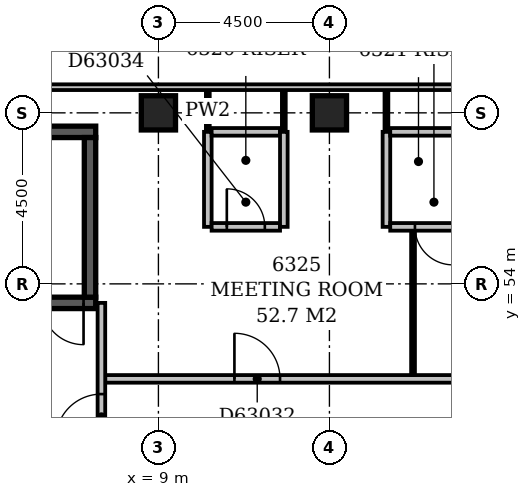
"""IFC4 building model, lengths in metres.
Left out: names, types, materials, properties, quantities, classifications, styles, units other than length and angle.
Written with IfcOpenShell. Run it as: python <this file> out.ifc"""

import sys

from ifc_helpers import new_model, si_unit, direction, frame, frame_2d, origin, origin_2d, place, context, subcontext, project, spatial, rectangle, extrude, element, fill, save


model = new_model("IFC4")
c1 = context("Model", 3, precision=1e-05, world=origin(), true_north=direction((0.0, 1.0)))
c2 = subcontext(c1, "Body", "Model", "MODEL_VIEW")
j1 = project(units=[si_unit("LENGTHUNIT", "METRE"), si_unit("PLANEANGLEUNIT", "RADIAN")], contexts=[c1])
p1 = place(None, origin())
s1 = spatial("IfcSite", under=j1, at=p1, CompositionType="ELEMENT")
p2 = place(p1, origin())
s2 = spatial("IfcBuilding", under=s1, at=p2, CompositionType="ELEMENT")
p3 = place(p2, frame((0.0, 0.0, 243.8)))
s3 = spatial("IfcBuildingStorey", under=s2, at=p3, CompositionType="ELEMENT", Elevation=243.8)
p4 = place(p3, frame((0.35, 53.5, -0.3), z_axis=(0.0, 0.0, 1.0), x_axis=(1.0, 0.0, 0.0)))
e1 = element("IfcWall", 1, at=p4, inside=s3, PredefinedType="SHEAR", context=c2, shape_type="SweptSolid", body=[
    extrude(rectangle(XDim=7.0, YDim=0.3, at=frame_2d((3.5, 0.0))), origin(), (0.0, 0.0, 1.0), 3.6),
])
p5 = place(p4, frame((5.58, 0.0, 0.3)))
e2 = element("IfcOpeningElement", 2, at=p5, cuts=e1, PredefinedType="OPENING", context=c2, shape_type="SweptSolid", body=[
    extrude(rectangle(XDim=1.1, YDim=2.1, at=frame_2d((0.55, 1.05))), frame((0.0, 0.162, 0.0), z_axis=(0.0, -1.0, 0.0), x_axis=(1.0, 0.0, 0.0)), (0.0, 0.0, 1.0), 0.324),
])
p6 = place(p3, frame((0.35, 58.0, -0.3), z_axis=(0.0, 0.0, 1.0), x_axis=(1.0, 0.0, 0.0)))
e3 = element("IfcWall", 3, at=p6, inside=s3, PredefinedType="SHEAR", context=c2, shape_type="SweptSolid", body=[
    extrude(rectangle(XDim=7.0, YDim=0.3, at=frame_2d((3.5, 0.0))), origin(), (0.0, 0.0, 1.0), 3.6),
])
p7 = place(p3, frame((7.2, 53.65, -0.3), z_axis=(0.0, 0.0, 1.0), x_axis=(0.0, 1.0, 0.0)))
e4 = element("IfcWall", 4, at=p7, inside=s3, PredefinedType="SHEAR", context=c2, shape_type="SweptSolid", body=[
    extrude(rectangle(XDim=4.2, YDim=0.3, at=frame_2d((2.1, 0.0))), origin(), (0.0, 0.0, 1.0), 3.6),
])
for number, where, z_axis, x_axis in (
    (5, (9.0, 58.5, -0.3), (0.0, 0.0, 1.0), (1.0, 0.0, 0.0)),
    (6, (13.5, 58.5, -0.3), (0.0, 0.0, 1.0), (1.0, 0.0, 0.0)),
):
    element("IfcColumn", number, at=place(p3, frame(where, z_axis=z_axis, x_axis=x_axis)), inside=s3, PredefinedType="COLUMN", context=c2, shape_type="SweptSolid", body=[
        extrude(rectangle(XDim=0.9, YDim=0.9, at=origin_2d()), origin(), (0.0, 0.0, 1.0), 3.6),
    ])
p8 = place(p3, frame((27.0, 59.175, 0.0), z_axis=(0.0, 0.0, 1.0), x_axis=(-1.0, 0.0, 0.0)))
e7 = element("IfcWall", 7, at=p8, inside=s3, PredefinedType="STANDARD", context=c2, shape_type="SweptSolid", body=[
    extrude(rectangle(XDim=27.75, YDim=0.15, at=frame_2d((13.875, 0.0))), origin(), (0.0, 0.0, 1.0), 2.7),
])
p9 = place(p3, frame((7.5, 49.6, 0.0), z_axis=(0.0, 0.0, 1.0), x_axis=(0.0, 1.0, 0.0)))
e8 = element("IfcWall", 8, at=p9, inside=s3, PredefinedType="PARTITIONING", context=c2, shape_type="SweptSolid", body=[
    extrude(rectangle(XDim=3.9, YDim=0.2, at=frame_2d((1.95, 0.0))), origin(), (0.0, 0.0, 1.0), 3.3),
])
p10 = place(p9, frame((0.3, 0.0, 0.0)))
e9 = element("IfcOpeningElement", 9, at=p10, cuts=e8, PredefinedType="OPENING", context=c2, shape_type="SweptSolid", body=[
    extrude(rectangle(XDim=1.2, YDim=2.1, at=frame_2d((0.6, 1.05))), frame((0.0, 0.112, 0.0), z_axis=(0.0, -1.0, 0.0), x_axis=(1.0, 0.0, 0.0)), (0.0, 0.0, 1.0), 0.224),
])
p11 = place(p3, frame((7.6, 51.5, 0.0), z_axis=(0.0, 0.0, 1.0), x_axis=(1.0, 0.0, 0.0)))
e10 = element("IfcWall", 10, at=p11, inside=s3, PredefinedType="PARTITIONING", context=c2, shape_type="SweptSolid", body=[
    extrude(rectangle(XDim=14.65, YDim=0.2, at=frame_2d((7.325, 0.0))), origin(), (0.0, 0.0, 1.0), 3.3),
])
p12 = place(p11, frame((3.4, 0.0, 0.0)))
e11 = element("IfcOpeningElement", 11, at=p12, cuts=e10, PredefinedType="OPENING", context=c2, shape_type="SweptSolid", body=[
    extrude(rectangle(XDim=1.2, YDim=2.1, at=frame_2d((0.6, 1.05))), frame((0.0, 0.112, 0.0), z_axis=(0.0, -1.0, 0.0), x_axis=(1.0, 0.0, 0.0)), (0.0, 0.0, 1.0), 0.224),
])
p13 = place(p11, frame((10.925, 0.0, 0.0)))
e12 = element("IfcOpeningElement", 12, at=p13, cuts=e10, PredefinedType="OPENING", context=c2, shape_type="SweptSolid", body=[
    extrude(rectangle(XDim=1.0, YDim=2.1, at=frame_2d((0.5, 1.05))), frame((0.0, 0.112, 0.0), z_axis=(0.0, -1.0, 0.0), x_axis=(1.0, 0.0, 0.0)), (0.0, 0.0, 1.0), 0.224),
])
p14 = place(p3, frame((15.7, 51.6, 0.0), z_axis=(0.0, 0.0, 1.0), x_axis=(0.0, 1.0, 0.0)))
e13 = element("IfcWall", 13, at=p14, inside=s3, PredefinedType="PARTITIONING", context=c2, shape_type="SweptSolid", body=[
    extrude(rectangle(XDim=3.8, YDim=0.1, at=frame_2d((1.9, 0.0))), origin(), (0.0, 0.0, 1.0), 3.3),
])
p15 = place(p3, frame((10.3, 55.5, 0.0), z_axis=(0.0, 0.0, 1.0), x_axis=(0.0, 1.0, 0.0)))
e14 = element("IfcWall", 14, at=p15, inside=s3, PredefinedType="PARTITIONING", context=c2, shape_type="SweptSolid", body=[
    extrude(rectangle(XDim=2.5, YDim=0.2, at=frame_2d((1.25, 0.0))), origin(), (0.0, 0.0, 1.0), 3.3),
])
p16 = place(p3, frame((10.4, 55.5, 0.0), z_axis=(0.0, 0.0, 1.0), x_axis=(1.0, 0.0, 0.0)))
e15 = element("IfcWall", 15, at=p16, inside=s3, PredefinedType="PARTITIONING", context=c2, shape_type="SweptSolid", body=[
    extrude(rectangle(XDim=1.8, YDim=0.2, at=frame_2d((0.9, 0.0))), origin(), (0.0, 0.0, 1.0), 3.3),
])
p17 = place(p16, frame((0.4, 0.0, 0.0)))
e16 = element("IfcOpeningElement", 16, at=p17, cuts=e15, PredefinedType="OPENING", context=c2, shape_type="SweptSolid", body=[
    extrude(rectangle(XDim=1.0, YDim=2.1, at=frame_2d((0.5, 1.05))), frame((0.0, 0.112, 0.0), z_axis=(0.0, -1.0, 0.0), x_axis=(1.0, 0.0, 0.0)), (0.0, 0.0, 1.0), 0.224),
])
for number, where, z_axis, x_axis in (
    (17, (12.3, 55.5, 0.0), (0.0, 0.0, 1.0), (0.0, 1.0, 0.0)),
    (18, (15.0, 55.5, 0.0), (0.0, 0.0, 1.0), (0.0, 1.0, 0.0)),
):
    element("IfcWall", number, at=place(p3, frame(where, z_axis=z_axis, x_axis=x_axis)), inside=s3, PredefinedType="PARTITIONING", context=c2, shape_type="SweptSolid", body=[
        extrude(rectangle(XDim=2.5, YDim=0.2, at=frame_2d((1.25, 0.0))), origin(), (0.0, 0.0, 1.0), 3.3),
    ])
p18 = place(p3, frame((15.1, 55.5, 0.0), z_axis=(0.0, 0.0, 1.0), x_axis=(1.0, 0.0, 0.0)))
e19 = element("IfcWall", 19, at=p18, inside=s3, PredefinedType="PARTITIONING", context=c2, shape_type="SweptSolid", body=[
    extrude(rectangle(XDim=1.8, YDim=0.2, at=frame_2d((0.9, 0.0))), origin(), (0.0, 0.0, 1.0), 3.3),
])
p19 = place(p18, frame((0.65, 0.0, 0.0)))
e20 = element("IfcOpeningElement", 20, at=p19, cuts=e19, PredefinedType="OPENING", context=c2, shape_type="SweptSolid", body=[
    extrude(rectangle(XDim=1.0, YDim=2.1, at=frame_2d((0.5, 1.05))), frame((0.0, 0.112, 0.0), z_axis=(0.0, -1.0, 0.0), x_axis=(1.0, 0.0, 0.0)), (0.0, 0.0, 1.0), 0.224),
])
p20 = place(p3, frame((10.3, 58.0, 0.0), z_axis=(0.0, 0.0, 1.0), x_axis=(0.0, 1.0, 0.0)))
e21 = element("IfcWall", 21, at=p20, inside=s3, PredefinedType="PARTITIONING", context=c2, shape_type="SweptSolid", body=[
    extrude(rectangle(XDim=1.1, YDim=0.1, at=frame_2d((0.55, 0.0))), origin(), (0.0, 0.0, 1.0), 3.3),
])
p21 = place(p3, frame((10.4, 58.0, 0.0), z_axis=(0.0, 0.0, 1.0), x_axis=(1.0, 0.0, 0.0)))
e22 = element("IfcWall", 22, at=p21, inside=s3, PredefinedType="PARTITIONING", context=c2, shape_type="SweptSolid", body=[
    extrude(rectangle(XDim=1.8, YDim=0.2, at=frame_2d((0.9, 0.0))), origin(), (0.0, 0.0, 1.0), 3.3),
])
for number, where, z_axis, x_axis in (
    (23, (12.3, 58.0, 0.0), (0.0, 0.0, 1.0), (0.0, 1.0, 0.0)),
    (24, (15.0, 58.0, 0.0), (0.0, 0.0, 1.0), (0.0, 1.0, 0.0)),
):
    element("IfcWall", number, at=place(p3, frame(where, z_axis=z_axis, x_axis=x_axis)), inside=s3, PredefinedType="PARTITIONING", context=c2, shape_type="SweptSolid", body=[
        extrude(rectangle(XDim=1.1, YDim=0.1, at=frame_2d((0.55, 0.0))), origin(), (0.0, 0.0, 1.0), 3.3),
    ])
p22 = place(p3, frame((15.1, 58.0, 0.0), z_axis=(0.0, 0.0, 1.0), x_axis=(1.0, 0.0, 0.0)))
e25 = element("IfcWall", 25, at=p22, inside=s3, PredefinedType="PARTITIONING", context=c2, shape_type="SweptSolid", body=[
    extrude(rectangle(XDim=1.8, YDim=0.2, at=frame_2d((0.9, 0.0))), origin(), (0.0, 0.0, 1.0), 3.3),
])
p23 = place(p10, origin())
e26 = element("IfcDoor", 26, at=p23, inside=s3, OperationType="SINGLE_SWING_LEFT", PredefinedType="DOOR", context=c2, shape_type="SweptSolid", body=[
    extrude(rectangle(XDim=1.2, YDim=2.1, at=frame_2d((0.6, 1.05))), frame((0.0, 0.025, 0.0), z_axis=(0.0, -1.0, 0.0), x_axis=(1.0, 0.0, 0.0)), (0.0, 0.0, 1.0), 0.05),
])
fill(e9, e26)
p24 = place(p5, origin())
e27 = element("IfcDoor", 27, at=p24, inside=s3, OperationType="SINGLE_SWING_RIGHT", PredefinedType="DOOR", context=c2, shape_type="SweptSolid", body=[
    extrude(rectangle(XDim=1.1, YDim=2.1, at=frame_2d((0.55, 1.05))), frame((0.0, 0.025, 0.0), z_axis=(0.0, -1.0, 0.0), x_axis=(1.0, 0.0, 0.0)), (0.0, 0.0, 1.0), 0.05),
])
fill(e2, e27)
p25 = place(p12, origin())
e28 = element("IfcDoor", 28, at=p25, inside=s3, OperationType="SINGLE_SWING_LEFT", PredefinedType="DOOR", context=c2, shape_type="SweptSolid", body=[
    extrude(rectangle(XDim=1.2, YDim=2.1, at=frame_2d((0.6, 1.05))), frame((0.0, 0.025, 0.0), z_axis=(0.0, -1.0, 0.0), x_axis=(1.0, 0.0, 0.0)), (0.0, 0.0, 1.0), 0.05),
])
fill(e11, e28)
p26 = place(p17, origin())
e29 = element("IfcDoor", 29, at=p26, inside=s3, OperationType="SINGLE_SWING_LEFT", PredefinedType="DOOR", context=c2, shape_type="SweptSolid", body=[
    extrude(rectangle(XDim=1.0, YDim=2.1, at=frame_2d((0.5, 1.05))), frame((0.0, 0.025, 0.0), z_axis=(0.0, -1.0, 0.0), x_axis=(1.0, 0.0, 0.0)), (0.0, 0.0, 1.0), 0.05),
])
fill(e16, e29)
p27 = place(p19, origin())
e30 = element("IfcDoor", 30, at=p27, inside=s3, OperationType="SINGLE_SWING_RIGHT", PredefinedType="DOOR", context=c2, shape_type="SweptSolid", body=[
    extrude(rectangle(XDim=1.0, YDim=2.1, at=frame_2d((0.5, 1.05))), frame((0.0, 0.025, 0.0), z_axis=(0.0, -1.0, 0.0), x_axis=(1.0, 0.0, 0.0)), (0.0, 0.0, 1.0), 0.05),
])
fill(e20, e30)
save(model, sys.argv[1])
